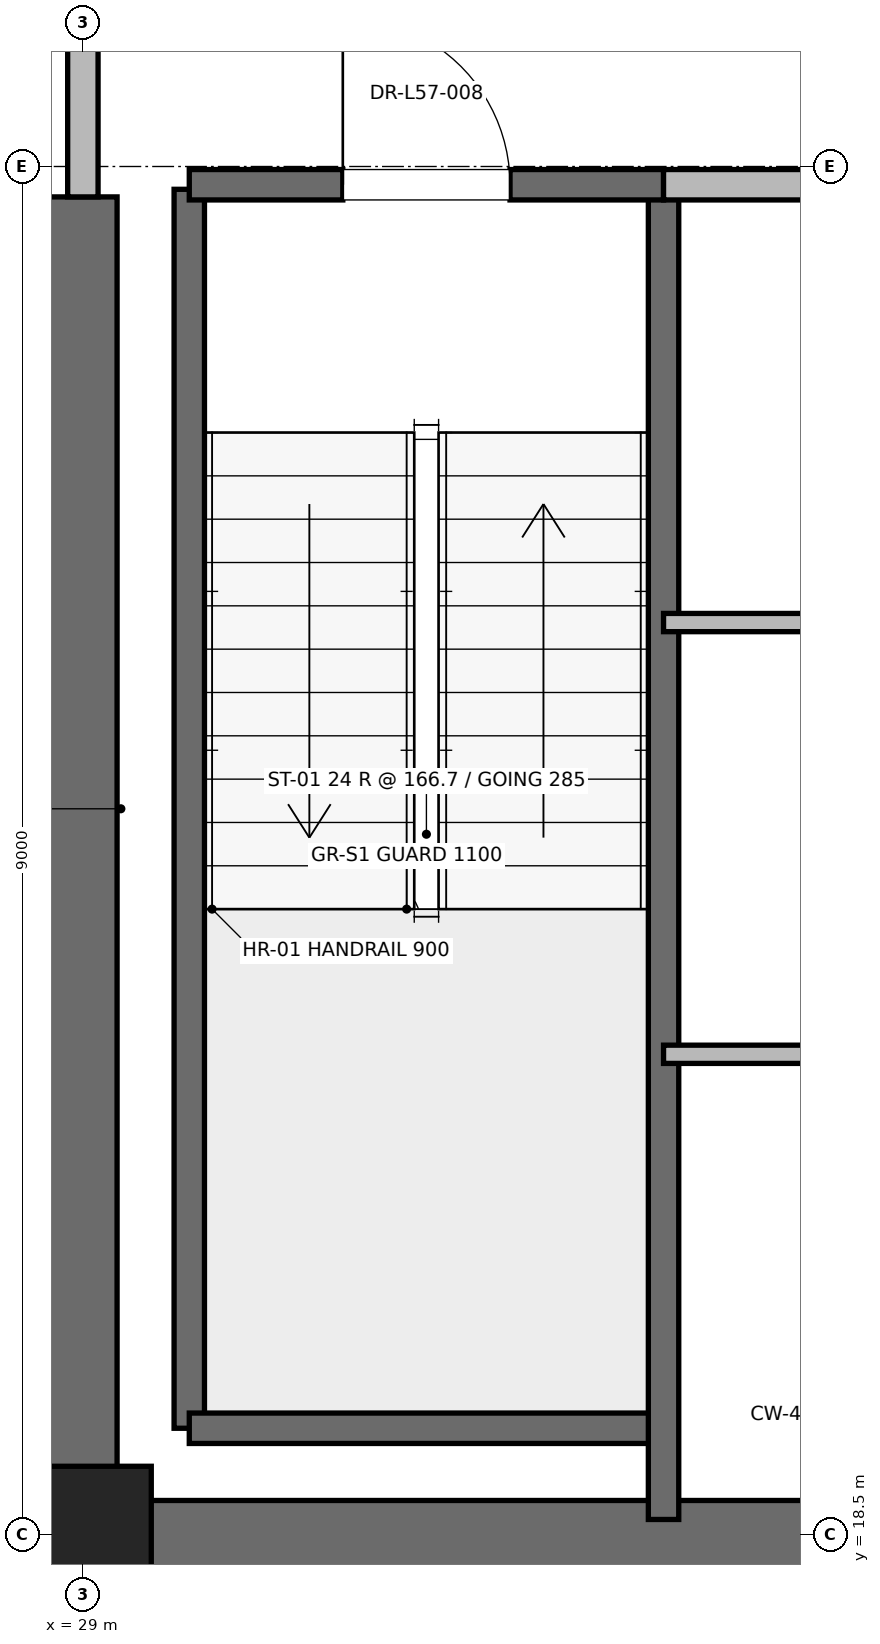
"""IFC4 building model, lengths in metres.
Left out: names, types, materials, properties, quantities, classifications, styles, units other than length and angle.
Written with IfcOpenShell. Run it as: python <this file> out.ifc"""

import sys

from ifc_helpers import new_model, si_unit, direction, frame, frame_2d, origin, origin_2d, place, context, subcontext, project, spatial, rectangle, extrude, element, fill, save


model = new_model("IFC4")
c1 = context("Model", 3, precision=1e-05, world=origin(), true_north=direction((0.0, 1.0)))
c2 = subcontext(c1, "Body", "Model", "MODEL_VIEW")
j1 = project(units=[si_unit("LENGTHUNIT", "METRE"), si_unit("PLANEANGLEUNIT", "RADIAN")], contexts=[c1])
p1 = place(None, origin())
s1 = spatial("IfcSite", under=j1, at=p1, CompositionType="ELEMENT")
p2 = place(p1, origin())
s2 = spatial("IfcBuilding", under=s1, at=p2, CompositionType="ELEMENT")
p3 = place(p2, frame((0.0, 0.0, 247.2)))
s3 = spatial("IfcBuildingStorey", under=s2, at=p3, CompositionType="ELEMENT", Elevation=247.2)
p4 = place(p3, frame((29.0, 18.5, 0.0), z_axis=(0.0, 0.0, 1.0), x_axis=(1.0, 0.0, 0.0)))
e1 = element("IfcColumn", 1, at=p4, inside=s3, PredefinedType="PILASTER", context=c2, shape_type="SweptSolid", body=[
    extrude(rectangle(XDim=0.9, YDim=0.9, at=origin_2d()), origin(), (0.0, 0.0, 1.0), 4.0),
])
p5 = place(p3, frame((29.0, 18.5, 0.0), z_axis=(0.0, 0.0, 1.0), x_axis=(1.0, 0.0, 0.0)))
e2 = element("IfcWall", 2, at=p5, inside=s3, PredefinedType="SHEAR", context=c2, shape_type="SweptSolid", body=[
    extrude(rectangle(XDim=9.2, YDim=0.45, at=frame_2d((4.6, 0.0))), origin(), (0.0, 0.0, 1.0), 3.785),
])
p6 = place(p3, frame((29.0, 18.5, 0.0), z_axis=(0.0, 0.0, 1.0), x_axis=(0.0, 1.0, 0.0)))
e3 = element("IfcWall", 3, at=p6, inside=s3, PredefinedType="SHEAR", context=c2, shape_type="SweptSolid", body=[
    extrude(rectangle(XDim=8.8, YDim=0.45, at=frame_2d((4.4, 0.0))), origin(), (0.0, 0.0, 1.0), 3.785),
])
p7 = place(p3, frame((29.7, 19.2, 0.0), z_axis=(0.0, 0.0, 1.0), x_axis=(0.0, 1.0, 0.0)))
e4 = element("IfcWall", 4, at=p7, inside=s3, PredefinedType="SOLIDWALL", context=c2, shape_type="SweptSolid", body=[
    extrude(rectangle(XDim=8.15, YDim=0.2, at=frame_2d((4.075, 0.0))), origin(), (0.0, 0.0, 1.0), 3.785),
])
p8 = place(p3, frame((29.7, 19.2, 0.0), z_axis=(0.0, 0.0, 1.0), x_axis=(1.0, 0.0, 0.0)))
e5 = element("IfcWall", 5, at=p8, inside=s3, PredefinedType="SOLIDWALL", context=c2, shape_type="SweptSolid", body=[
    extrude(rectangle(XDim=3.12, YDim=0.2, at=frame_2d((1.56, 0.0))), origin(), (0.0, 0.0, 1.0), 3.785),
])
p9 = place(p3, frame((32.82, 18.6, 0.0), z_axis=(0.0, 0.0, 1.0), x_axis=(0.0, 1.0, 0.0)))
e6 = element("IfcWall", 6, at=p9, inside=s3, PredefinedType="SOLIDWALL", context=c2, shape_type="SweptSolid", body=[
    extrude(rectangle(XDim=8.78, YDim=0.2, at=frame_2d((4.39, 0.0))), origin(), (0.0, 0.0, 1.0), 3.785),
])
p10 = place(p3, frame((29.7, 27.38, 0.0), z_axis=(0.0, 0.0, 1.0), x_axis=(1.0, 0.0, 0.0)))
e7 = element("IfcWall", 7, at=p10, inside=s3, PredefinedType="SOLIDWALL", context=c2, shape_type="SweptSolid", body=[
    extrude(rectangle(XDim=3.12, YDim=0.2, at=frame_2d((1.56, 0.0))), origin(), (0.0, 0.0, 1.0), 3.785),
])
p11 = place(p10, frame((1.01, 0.0, 0.0)))
e8 = element("IfcOpeningElement", 8, at=p11, cuts=e7, PredefinedType="OPENING", context=c2, shape_type="SweptSolid", body=[
    extrude(rectangle(XDim=1.1, YDim=2.15, at=frame_2d((0.55, 1.075))), frame((0.0, 0.1, 0.0), z_axis=(0.0, -1.0, 0.0), x_axis=(1.0, 0.0, 0.0)), (0.0, 0.0, 1.0), 0.2),
])
p12 = place(p3, frame((29.0, 27.3, 0.0), z_axis=(0.0, 0.0, 1.0), x_axis=(0.0, 1.0, 0.0)))
e9 = element("IfcWall", 9, at=p12, inside=s3, PredefinedType="PARTITIONING", context=c2, shape_type="SweptSolid", body=[
    extrude(rectangle(XDim=3.4, YDim=0.2, at=frame_2d((1.7, 0.0))), origin(), (0.0, 0.0, 1.0), 2.865),
])
p13 = place(p12, frame((1.125, 0.0, 0.0)))
e10 = element("IfcOpeningElement", 10, at=p13, cuts=e9, PredefinedType="OPENING", context=c2, shape_type="SweptSolid", body=[
    extrude(rectangle(XDim=1.15, YDim=2.2, at=frame_2d((0.575, 1.1))), frame((0.0, 0.1, 0.0), z_axis=(0.0, -1.0, 0.0), x_axis=(1.0, 0.0, 0.0)), (0.0, 0.0, 1.0), 0.2),
])
p14 = place(p3, frame((32.82, 27.38, 0.0), z_axis=(0.0, 0.0, 1.0), x_axis=(1.0, 0.0, 0.0)))
e11 = element("IfcWall", 11, at=p14, inside=s3, PredefinedType="PARTITIONING", context=c2, shape_type="SweptSolid", body=[
    extrude(rectangle(XDim=5.62, YDim=0.2, at=frame_2d((2.81, 0.0))), origin(), (0.0, 0.0, 1.0), 3.785),
])
for number, where, z_axis, x_axis in (
    (12, (32.82, 21.66, 0.0), (0.0, 0.0, 1.0), (1.0, 0.0, 0.0)),
    (13, (32.82, 24.5, 0.0), (0.0, 0.0, 1.0), (1.0, 0.0, 0.0)),
):
    element("IfcWall", number, at=place(p3, frame(where, z_axis=z_axis, x_axis=x_axis)), inside=s3, PredefinedType="PARTITIONING", context=c2, shape_type="SweptSolid", body=[
        extrude(rectangle(XDim=5.23, YDim=0.12, at=frame_2d((2.615, 0.0))), origin(), (0.0, 0.0, 1.0), 2.85),
    ])
p15 = place(p11, origin())
e14 = element("IfcDoor", 14, at=p15, inside=s3, OperationType="SINGLE_SWING_LEFT", PredefinedType="DOOR", context=c2, shape_type="SweptSolid", body=[
    extrude(rectangle(XDim=1.1, YDim=2.15, at=frame_2d((0.55, 1.075))), frame((0.0, 0.025, 0.0), z_axis=(0.0, -1.0, 0.0), x_axis=(1.0, 0.0, 0.0)), (0.0, 0.0, 1.0), 0.05),
])
fill(e8, e14)
save(model, sys.argv[1])
